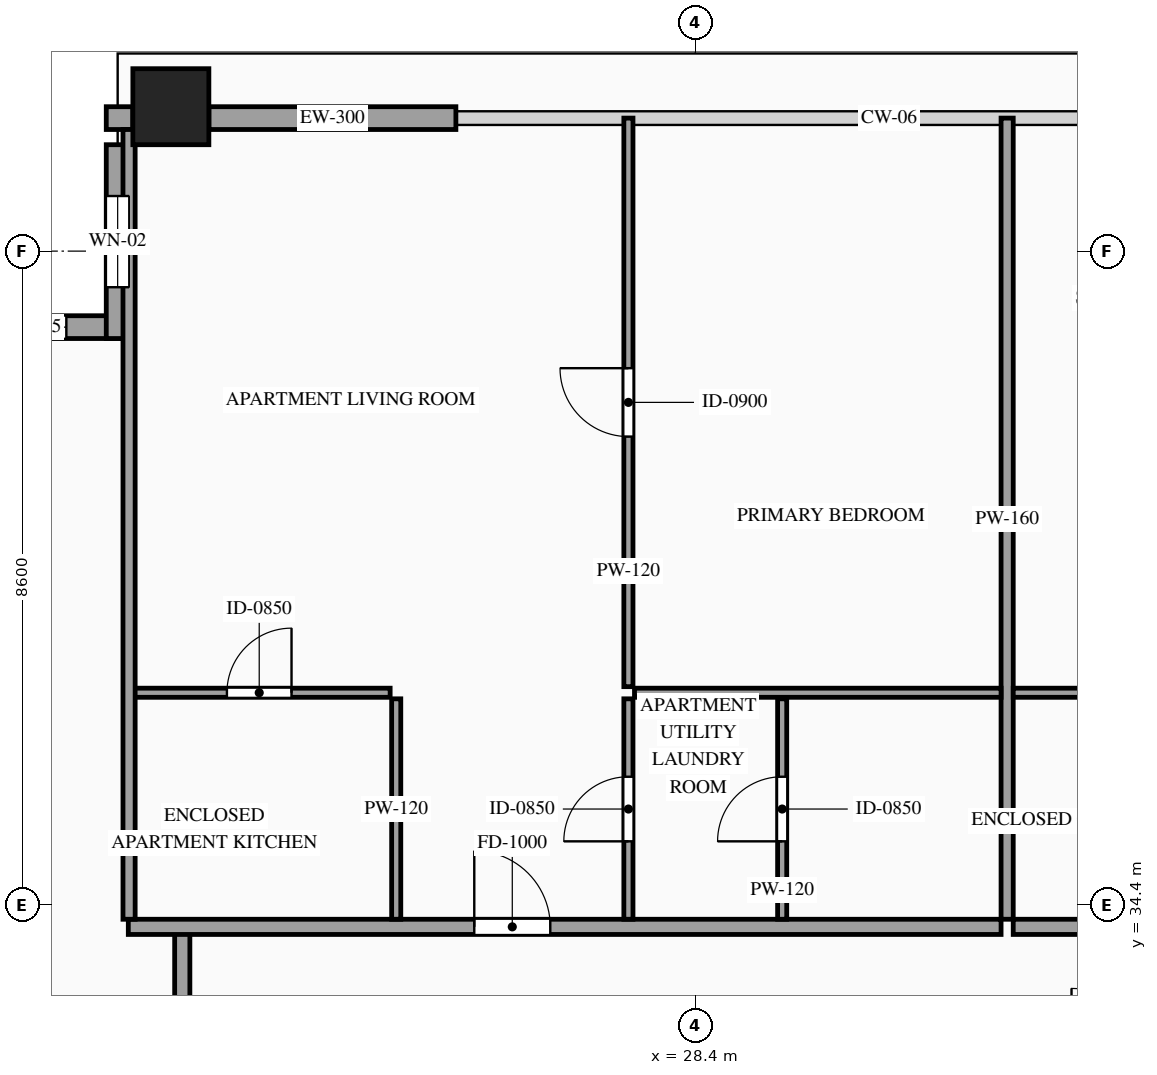
"""IFC4 building model, lengths in metres.
Left out: names, types, materials, properties, quantities, classifications, styles, units other than length and angle.
Written with IfcOpenShell. Run it as: python <this file> out.ifc"""

import sys

from ifc_helpers import new_model, si_unit, direction, frame, frame_2d, origin, origin_2d, place, context, subcontext, project, spatial, rectangle, hollow_rectangle, extrude, source, transform, mapped, element, fill, save


model = new_model("IFC4")
c1 = context("Model", 3, precision=1e-05, world=origin(), true_north=direction((0.0, 1.0)))
c2 = subcontext(c1, "Body", "Model", "MODEL_VIEW")
j1 = project(units=[si_unit("LENGTHUNIT", "METRE"), si_unit("PLANEANGLEUNIT", "RADIAN")], contexts=[c1])
p1 = place(None, origin())
s1 = spatial("IfcSite", under=j1, at=p1, CompositionType="ELEMENT")
p2 = place(p1, origin())
s2 = spatial("IfcBuilding", under=s1, at=p2, CompositionType="ELEMENT")
p3 = place(p2, frame((0.0, 0.0, 347.2)))
s3 = spatial("IfcBuildingStorey", under=s2, at=p3, CompositionType="ELEMENT", Elevation=347.2)
m1 = source(origin(), c2, "Body", "SweptSolid", [
    extrude(hollow_rectangle(XDim=1.0, YDim=1.0, WallThickness=0.048, at=origin_2d()), origin(), (0.0, 0.0, 1.0), 4.0),
])
p4 = place(p3, frame((21.5, 44.9, 0.0), z_axis=(0.0, 0.0, 1.0), x_axis=(1.0, 0.0, 0.0)))
e1 = element("IfcColumn", 1, at=p4, inside=s3, PredefinedType="COLUMN", context=c2, shape_type="MappedRepresentation", body=[
    mapped(m1, transform((0.0, 0.0, 0.0), scale=1.0)),
])
p5 = place(p3, frame((20.95, 42.0, 0.0), z_axis=(0.0, 0.0, 1.0), x_axis=(-1.0, 0.0, 0.0)))
e2 = element("IfcWall", 2, at=p5, inside=s3, PredefinedType="SOLIDWALL", context=c2, shape_type="SweptSolid", body=[
    extrude(rectangle(XDim=2.55, YDim=0.3, at=frame_2d((1.275, 0.0))), origin(), (0.0, 0.0, 1.0), 3.7),
])
p6 = place(p5, frame((0.825, 0.0, 0.85)))
e3 = element("IfcOpeningElement", 3, at=p6, cuts=e2, PredefinedType="OPENING", context=c2, shape_type="SweptSolid", body=[
    extrude(rectangle(XDim=0.9, YDim=1.5, at=frame_2d((0.45, 0.75))), frame((0.0, 0.165, 0.0), z_axis=(0.0, -1.0, 0.0), x_axis=(1.0, 0.0, 0.0)), (0.0, 0.0, 1.0), 0.33),
])
p7 = place(p3, frame((20.8, 44.4, 0.0), z_axis=(0.0, 0.0, 1.0), x_axis=(0.0, -1.0, 0.0)))
e4 = element("IfcWall", 4, at=p7, inside=s3, PredefinedType="SOLIDWALL", context=c2, shape_type="SweptSolid", body=[
    extrude(rectangle(XDim=2.55, YDim=0.3, at=frame_2d((1.275, 0.0))), origin(), (0.0, 0.0, 1.0), 3.7),
])
p8 = place(p7, frame((0.675, 0.0, 0.85)))
e5 = element("IfcOpeningElement", 5, at=p8, cuts=e4, PredefinedType="OPENING", context=c2, shape_type="SweptSolid", body=[
    extrude(rectangle(XDim=1.2, YDim=2.1, at=frame_2d((0.6, 1.05))), frame((0.0, 0.165, 0.0), z_axis=(0.0, -1.0, 0.0), x_axis=(1.0, 0.0, 0.0)), (0.0, 0.0, 1.0), 0.33),
])
m2 = source(origin(), c2, "Body", "SweptSolid", [
    extrude(rectangle(XDim=0.35, YDim=0.3, at=frame_2d((0.175, 0.0))), origin(), (0.0, 0.0, 1.0), 3.7),
])
p9 = place(p3, frame((20.65, 44.75, 0.0), z_axis=(0.0, 0.0, 1.0), x_axis=(1.0, 0.0, 0.0)))
e6 = element("IfcWall", 6, at=p9, inside=s3, PredefinedType="SOLIDWALL", context=c2, shape_type="MappedRepresentation", body=[
    mapped(m2, transform((0.0, 0.0, 0.0), scale=1.0)),
])
m3 = source(origin(), c2, "Body", "SweptSolid", [
    extrude(rectangle(XDim=3.25, YDim=0.3, at=frame_2d((1.625, 0.0))), origin(), (0.0, 0.0, 1.0), 3.305),
])
p10 = place(p3, frame((22.0, 44.75, 0.0), z_axis=(0.0, 0.0, 1.0), x_axis=(1.0, 0.0, 0.0)))
e7 = element("IfcWall", 7, at=p10, inside=s3, PredefinedType="SOLIDWALL", context=c2, shape_type="MappedRepresentation", body=[
    mapped(m3, transform((0.0, 0.0, 0.0), scale=1.0)),
])
m4 = source(origin(), c2, "Body", "SweptSolid", [
    extrude(rectangle(XDim=1.7, YDim=0.2, at=frame_2d((0.85, 0.0))), origin(), (0.0, 0.0, 1.0), 3.7),
])
p11 = place(p3, frame((21.65, 32.35, 0.0), z_axis=(0.0, 0.0, 1.0), x_axis=(0.0, 1.0, 0.0)))
e8 = element("IfcWall", 8, at=p11, inside=s3, PredefinedType="PARTITIONING", context=c2, shape_type="MappedRepresentation", body=[
    mapped(m4, transform((0.0, 0.0, 0.0), scale=1.0)),
])
p12 = place(p3, frame((20.94, 34.11, 0.0), z_axis=(0.0, 0.0, 1.0), x_axis=(1.0, 0.0, 0.0)))
e9 = element("IfcWall", 9, at=p12, inside=s3, PredefinedType="PARTITIONING", context=c2, shape_type="SweptSolid", body=[
    extrude(rectangle(XDim=11.483, YDim=0.2, at=frame_2d((5.742, 0.0))), origin(), (0.0, 0.0, 1.0), 3.7),
])
p13 = place(p12, frame((4.552, 0.0, 0.0)))
e10 = element("IfcOpeningElement", 10, at=p13, cuts=e9, PredefinedType="OPENING", context=c2, shape_type="SweptSolid", body=[
    extrude(rectangle(XDim=1.0, YDim=2.2, at=frame_2d((0.5, 1.1))), frame((0.0, 0.115, 0.0), z_axis=(0.0, -1.0, 0.0), x_axis=(1.0, 0.0, 0.0)), (0.0, 0.0, 1.0), 0.23),
])
m5 = source(origin(), c2, "Body", "SweptSolid", [
    extrude(rectangle(XDim=10.54, YDim=0.16, at=frame_2d((5.27, 0.0))), origin(), (0.0, 0.0, 1.0), 3.7),
])
p14 = place(p3, frame((32.503, 34.21, 0.0), z_axis=(0.0, 0.0, 1.0), x_axis=(0.0, 1.0, 0.0)))
e11 = element("IfcWall", 11, at=p14, inside=s3, PredefinedType="PARTITIONING", context=c2, shape_type="MappedRepresentation", body=[
    mapped(m5, transform((0.0, 0.0, 0.0), scale=1.0)),
])
p15 = place(p3, frame((20.94, 37.19, 0.0), z_axis=(0.0, 0.0, 1.0), x_axis=(1.0, 0.0, 0.0)))
e12 = element("IfcWall", 12, at=p15, inside=s3, PredefinedType="PARTITIONING", context=c2, shape_type="SweptSolid", body=[
    extrude(rectangle(XDim=3.445, YDim=0.12, at=frame_2d((1.723, 0.0))), origin(), (0.0, 0.0, 1.0), 3.7),
])
p16 = place(p15, frame((1.298, 0.0, 0.0)))
e13 = element("IfcOpeningElement", 13, at=p16, cuts=e12, PredefinedType="OPENING", context=c2, shape_type="SweptSolid", body=[
    extrude(rectangle(XDim=0.85, YDim=2.1, at=frame_2d((0.425, 1.05))), frame((0.0, 0.075, 0.0), z_axis=(0.0, -1.0, 0.0), x_axis=(1.0, 0.0, 0.0)), (0.0, 0.0, 1.0), 0.15),
])
m6 = source(origin(), c2, "Body", "SweptSolid", [
    extrude(rectangle(XDim=2.9, YDim=0.12, at=frame_2d((1.45, 0.0))), origin(), (0.0, 0.0, 1.0), 3.7),
])
p17 = place(p3, frame((24.465, 34.21, 0.0), z_axis=(0.0, 0.0, 1.0), x_axis=(0.0, 1.0, 0.0)))
e14 = element("IfcWall", 14, at=p17, inside=s3, PredefinedType="PARTITIONING", context=c2, shape_type="MappedRepresentation", body=[
    mapped(m6, transform((0.0, 0.0, 0.0), scale=1.0)),
])
p18 = place(p3, frame((29.543, 34.21, 0.0), z_axis=(0.0, 0.0, 1.0), x_axis=(0.0, 1.0, 0.0)))
e15 = element("IfcWall", 15, at=p18, inside=s3, PredefinedType="PARTITIONING", context=c2, shape_type="SweptSolid", body=[
    extrude(rectangle(XDim=2.9, YDim=0.12, at=frame_2d((1.45, 0.0))), origin(), (0.0, 0.0, 1.0), 3.7),
])
p19 = place(p18, frame((1.025, 0.0, 0.0)))
e16 = element("IfcOpeningElement", 16, at=p19, cuts=e15, PredefinedType="OPENING", context=c2, shape_type="SweptSolid", body=[
    extrude(rectangle(XDim=0.85, YDim=2.1, at=frame_2d((0.425, 1.05))), frame((0.0, 0.075, 0.0), z_axis=(0.0, -1.0, 0.0), x_axis=(1.0, 0.0, 0.0)), (0.0, 0.0, 1.0), 0.15),
])
m7 = source(origin(), c2, "Body", "SweptSolid", [
    extrude(rectangle(XDim=4.823, YDim=0.12, at=frame_2d((2.412, 0.0))), origin(), (0.0, 0.0, 1.0), 3.7),
])
p20 = place(p3, frame((27.6, 37.19, 0.0), z_axis=(0.0, 0.0, 1.0), x_axis=(1.0, 0.0, 0.0)))
e17 = element("IfcWall", 17, at=p20, inside=s3, PredefinedType="PARTITIONING", context=c2, shape_type="MappedRepresentation", body=[
    mapped(m7, transform((0.0, 0.0, 0.0), scale=1.0)),
])
p21 = place(p3, frame((27.52, 37.27, 0.0), z_axis=(0.0, 0.0, 1.0), x_axis=(0.0, 1.0, 0.0)))
e18 = element("IfcWall", 18, at=p21, inside=s3, PredefinedType="PARTITIONING", context=c2, shape_type="SweptSolid", body=[
    extrude(rectangle(XDim=7.48, YDim=0.12, at=frame_2d((3.74, 0.0))), origin(), (0.0, 0.0, 1.0), 3.7),
])
p22 = place(p21, frame((3.29, 0.0, 0.0)))
e19 = element("IfcOpeningElement", 19, at=p22, cuts=e18, PredefinedType="OPENING", context=c2, shape_type="SweptSolid", body=[
    extrude(rectangle(XDim=0.9, YDim=2.15, at=frame_2d((0.45, 1.075))), frame((0.0, 0.075, 0.0), z_axis=(0.0, -1.0, 0.0), x_axis=(1.0, 0.0, 0.0)), (0.0, 0.0, 1.0), 0.15),
])
p23 = place(p3, frame((27.52, 34.21, 0.0), z_axis=(0.0, 0.0, 1.0), x_axis=(0.0, 1.0, 0.0)))
e20 = element("IfcWall", 20, at=p23, inside=s3, PredefinedType="PARTITIONING", context=c2, shape_type="SweptSolid", body=[
    extrude(rectangle(XDim=2.9, YDim=0.12, at=frame_2d((1.45, 0.0))), origin(), (0.0, 0.0, 1.0), 3.7),
])
p24 = place(p23, frame((1.025, 0.0, 0.0)))
e21 = element("IfcOpeningElement", 21, at=p24, cuts=e20, PredefinedType="OPENING", context=c2, shape_type="SweptSolid", body=[
    extrude(rectangle(XDim=0.85, YDim=2.1, at=frame_2d((0.425, 1.05))), frame((0.0, 0.075, 0.0), z_axis=(0.0, -1.0, 0.0), x_axis=(1.0, 0.0, 0.0)), (0.0, 0.0, 1.0), 0.15),
])
p25 = place(p3, frame((32.583, 34.11, 0.0), z_axis=(0.0, 0.0, 1.0), x_axis=(1.0, 0.0, 0.0)))
e22 = element("IfcWall", 22, at=p25, inside=s3, PredefinedType="PARTITIONING", context=c2, shape_type="SweptSolid", body=[
    extrude(rectangle(XDim=20.477, YDim=0.2, at=frame_2d((10.239, 0.0))), origin(), (0.0, 0.0, 1.0), 3.7),
])
p26 = place(p25, frame((11.557, 0.0, 0.0)))
e23 = element("IfcOpeningElement", 23, at=p26, cuts=e22, PredefinedType="OPENING", context=c2, shape_type="SweptSolid", body=[
    extrude(rectangle(XDim=1.0, YDim=2.2, at=frame_2d((0.5, 1.1))), frame((0.0, 0.115, 0.0), z_axis=(0.0, -1.0, 0.0), x_axis=(1.0, 0.0, 0.0)), (0.0, 0.0, 1.0), 0.23),
])
m8 = source(origin(), c2, "Body", "SweptSolid", [
    extrude(rectangle(XDim=10.39, YDim=0.16, at=frame_2d((5.195, 0.0))), origin(), (0.0, 0.0, 1.0), 3.7),
])
p27 = place(p3, frame((20.95, 34.21, 0.0), z_axis=(0.0, 0.0, 1.0), x_axis=(0.0, 1.0, 0.0)))
e24 = element("IfcWall", 24, at=p27, inside=s3, PredefinedType="PARTITIONING", context=c2, shape_type="MappedRepresentation", body=[
    mapped(m8, transform((0.0, 0.0, 0.0), scale=1.0)),
])
p28 = place(p3, frame((32.583, 37.19, 0.0), z_axis=(0.0, 0.0, 1.0), x_axis=(1.0, 0.0, 0.0)))
e25 = element("IfcWall", 25, at=p28, inside=s3, PredefinedType="PARTITIONING", context=c2, shape_type="SweptSolid", body=[
    extrude(rectangle(XDim=4.83, YDim=0.12, at=frame_2d((2.415, 0.0))), origin(), (0.0, 0.0, 1.0), 3.7),
])
p29 = place(p28, frame((1.99, 0.0, 0.0)))
e26 = element("IfcOpeningElement", 26, at=p29, cuts=e25, PredefinedType="OPENING", context=c2, shape_type="SweptSolid", body=[
    extrude(rectangle(XDim=0.85, YDim=2.1, at=frame_2d((0.425, 1.05))), frame((0.0, 0.075, 0.0), z_axis=(0.0, -1.0, 0.0), x_axis=(1.0, 0.0, 0.0)), (0.0, 0.0, 1.0), 0.15),
])
m9 = source(origin(), c2, "Body", "SweptSolid", [
    extrude(rectangle(XDim=0.9, YDim=1.5, at=frame_2d((0.45, 0.75))), frame((0.0, 0.03, 0.0), z_axis=(0.0, -1.0, 0.0), x_axis=(1.0, 0.0, 0.0)), (0.0, 0.0, 1.0), 0.06),
])
p30 = place(p6, origin())
e27 = element("IfcWindow", 27, at=p30, inside=s3, PartitioningType="SINGLE_PANEL", PredefinedType="WINDOW", context=c2, shape_type="MappedRepresentation", body=[
    mapped(m9, transform((0.0, 0.0, 0.0), scale=1.0)),
])
fill(e3, e27)
m10 = source(origin(), c2, "Body", "SweptSolid", [
    extrude(rectangle(XDim=1.2, YDim=2.1, at=frame_2d((0.6, 1.05))), frame((0.0, 0.03, 0.0), z_axis=(0.0, -1.0, 0.0), x_axis=(1.0, 0.0, 0.0)), (0.0, 0.0, 1.0), 0.06),
])
p31 = place(p8, origin())
e28 = element("IfcWindow", 28, at=p31, inside=s3, PartitioningType="SINGLE_PANEL", PredefinedType="WINDOW", context=c2, shape_type="MappedRepresentation", body=[
    mapped(m10, transform((0.0, 0.0, 0.0), scale=1.0)),
])
fill(e5, e28)
m11 = source(origin(), c2, "Body", "SweptSolid", [
    extrude(rectangle(XDim=1.0, YDim=2.2, at=frame_2d((0.5, 1.1))), frame((0.0, 0.025, 0.0), z_axis=(0.0, -1.0, 0.0), x_axis=(1.0, 0.0, 0.0)), (0.0, 0.0, 1.0), 0.05),
])
p32 = place(p13, origin())
e29 = element("IfcDoor", 29, at=p32, inside=s3, OperationType="SINGLE_SWING_LEFT", PredefinedType="DOOR", context=c2, shape_type="MappedRepresentation", body=[
    mapped(m11, transform((0.0, 0.0, 0.0), scale=1.0)),
])
fill(e10, e29)
m12 = source(origin(), c2, "Body", "SweptSolid", [
    extrude(rectangle(XDim=0.85, YDim=2.1, at=frame_2d((0.425, 1.05))), frame((0.0, 0.025, 0.0), z_axis=(0.0, -1.0, 0.0), x_axis=(1.0, 0.0, 0.0)), (0.0, 0.0, 1.0), 0.05),
])
p33 = place(p16, origin())
e30 = element("IfcDoor", 30, at=p33, inside=s3, OperationType="SINGLE_SWING_RIGHT", PredefinedType="DOOR", context=c2, shape_type="MappedRepresentation", body=[
    mapped(m12, transform((0.0, 0.0, 0.0), scale=1.0)),
])
fill(e13, e30)
p34 = place(p19, origin())
e31 = element("IfcDoor", 31, at=p34, inside=s3, OperationType="SINGLE_SWING_LEFT", PredefinedType="DOOR", context=c2, shape_type="MappedRepresentation", body=[
    mapped(m12, transform((0.0, 0.0, 0.0), scale=1.0)),
])
fill(e16, e31)
m13 = source(origin(), c2, "Body", "SweptSolid", [
    extrude(rectangle(XDim=0.9, YDim=2.15, at=frame_2d((0.45, 1.075))), frame((0.0, 0.025, 0.0), z_axis=(0.0, -1.0, 0.0), x_axis=(1.0, 0.0, 0.0)), (0.0, 0.0, 1.0), 0.05),
])
p35 = place(p22, origin())
e32 = element("IfcDoor", 32, at=p35, inside=s3, OperationType="SINGLE_SWING_RIGHT", PredefinedType="DOOR", context=c2, shape_type="MappedRepresentation", body=[
    mapped(m13, transform((0.0, 0.0, 0.0), scale=1.0)),
])
fill(e19, e32)
p36 = place(p24, origin())
e33 = element("IfcDoor", 33, at=p36, inside=s3, OperationType="SINGLE_SWING_LEFT", PredefinedType="DOOR", context=c2, shape_type="MappedRepresentation", body=[
    mapped(m12, transform((0.0, 0.0, 0.0), scale=1.0)),
])
fill(e21, e33)
save(model, sys.argv[1])
